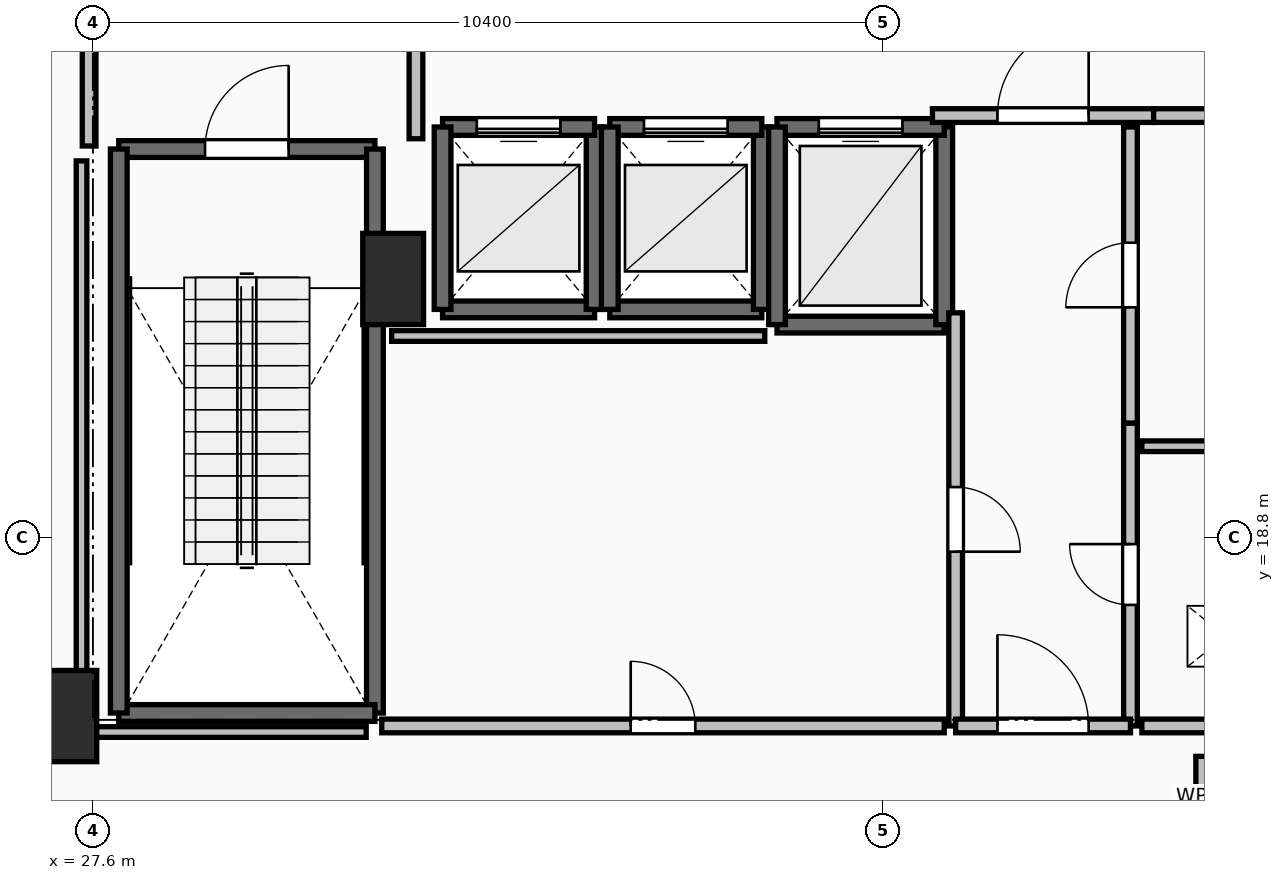
"""IFC4 building model, lengths in metres.
Left out: names, types, materials, properties, quantities, classifications, styles, units other than length and angle.
Written with IfcOpenShell. Run it as: python <this file> out.ifc"""

import sys

from ifc_helpers import new_model, si_unit, direction, frame, frame_2d, origin, origin_2d, place, context, subcontext, project, spatial, rectangle, extrude, element, fill, save


model = new_model("IFC4")
c1 = context("Model", 3, precision=1e-05, world=origin(), true_north=direction((0.0, 1.0)))
c2 = subcontext(c1, "Body", "Model", "MODEL_VIEW")
j1 = project(units=[si_unit("LENGTHUNIT", "METRE"), si_unit("PLANEANGLEUNIT", "RADIAN")], contexts=[c1])
p1 = place(None, origin())
s1 = spatial("IfcSite", under=j1, at=p1, CompositionType="ELEMENT")
p2 = place(p1, origin())
s2 = spatial("IfcBuilding", under=s1, at=p2, CompositionType="ELEMENT")
p3 = place(p2, origin())
s3 = spatial("IfcBuildingStorey", under=s2, at=p3, CompositionType="ELEMENT", Elevation=0.0)
for number, where, z_axis, x_axis in (
    (1, (27.25, 16.45, 0.0), (0.0, 0.0, 1.0), (1.0, 0.0, 0.0)),
    (2, (31.55, 22.2, 0.0), (0.0, 0.0, 1.0), (1.0, 0.0, 0.0)),
):
    element("IfcColumn", number, at=place(p3, frame(where, z_axis=z_axis, x_axis=x_axis)), inside=s3, PredefinedType="PILASTER", context=c2, shape_type="SweptSolid", body=[
        extrude(rectangle(XDim=0.8, YDim=1.2, at=origin_2d()), origin(), (0.0, 0.0, 1.0), 4.8),
    ])
p4 = place(p3, frame((27.94, 23.91, 0.0), z_axis=(0.0, 0.0, 1.0), x_axis=(1.0, 0.0, 0.0)))
e3 = element("IfcWall", 3, at=p4, inside=s3, PredefinedType="SOLIDWALL", context=c2, shape_type="SweptSolid", body=[
    extrude(rectangle(XDim=3.37, YDim=0.22, at=frame_2d((1.685, 0.0))), origin(), (0.0, 0.0, 1.0), 4.48),
])
p5 = place(p4, frame((1.135, 0.0, 0.0)))
e4 = element("IfcOpeningElement", 4, at=p5, cuts=e3, PredefinedType="OPENING", context=c2, shape_type="SweptSolid", body=[
    extrude(rectangle(XDim=1.1, YDim=2.15, at=frame_2d((0.55, 1.075))), frame((0.0, 0.125, 0.0), z_axis=(0.0, -1.0, 0.0), x_axis=(1.0, 0.0, 0.0)), (0.0, 0.0, 1.0), 0.25),
])
p6 = place(p3, frame((31.31, 23.91, 0.0), z_axis=(0.0, 0.0, 1.0), x_axis=(0.0, -1.0, 0.0)))
e5 = element("IfcWall", 5, at=p6, inside=s3, PredefinedType="SOLIDWALL", context=c2, shape_type="SweptSolid", body=[
    extrude(rectangle(XDim=7.42, YDim=0.22, at=frame_2d((3.71, 0.0))), origin(), (0.0, 0.0, 1.0), 4.48),
])
p7 = place(p3, frame((31.31, 16.49, 0.0), z_axis=(0.0, 0.0, 1.0), x_axis=(-1.0, 0.0, 0.0)))
e6 = element("IfcWall", 6, at=p7, inside=s3, PredefinedType="SOLIDWALL", context=c2, shape_type="SweptSolid", body=[
    extrude(rectangle(XDim=3.37, YDim=0.22, at=frame_2d((1.685, 0.0))), origin(), (0.0, 0.0, 1.0), 4.48),
])
p8 = place(p3, frame((27.94, 16.49, 0.0), z_axis=(0.0, 0.0, 1.0), x_axis=(0.0, 1.0, 0.0)))
e7 = element("IfcWall", 7, at=p8, inside=s3, PredefinedType="SOLIDWALL", context=c2, shape_type="SweptSolid", body=[
    extrude(rectangle(XDim=7.42, YDim=0.22, at=frame_2d((3.71, 0.0))), origin(), (0.0, 0.0, 1.0), 4.48),
])
p9 = place(p3, frame((32.2, 21.8, 0.0), z_axis=(0.0, 0.0, 1.0), x_axis=(1.0, 0.0, 0.0)))
e8 = element("IfcWall", 8, at=p9, inside=s3, PredefinedType="SOLIDWALL", context=c2, shape_type="SweptSolid", body=[
    extrude(rectangle(XDim=2.0, YDim=0.22, at=frame_2d((1.0, 0.0))), origin(), (0.0, 0.0, 1.0), 4.48),
])
p10 = place(p3, frame((34.2, 21.8, 0.0), z_axis=(0.0, 0.0, 1.0), x_axis=(0.0, 1.0, 0.0)))
e9 = element("IfcWall", 9, at=p10, inside=s3, PredefinedType="SOLIDWALL", context=c2, shape_type="SweptSolid", body=[
    extrude(rectangle(XDim=2.4, YDim=0.22, at=frame_2d((1.2, 0.0))), origin(), (0.0, 0.0, 1.0), 4.48),
])
p11 = place(p3, frame((34.2, 24.2, 0.0), z_axis=(0.0, 0.0, 1.0), x_axis=(-1.0, 0.0, 0.0)))
e10 = element("IfcWall", 10, at=p11, inside=s3, PredefinedType="SOLIDWALL", context=c2, shape_type="SweptSolid", body=[
    extrude(rectangle(XDim=2.0, YDim=0.22, at=frame_2d((1.0, 0.0))), origin(), (0.0, 0.0, 1.0), 4.48),
])
p12 = place(p11, frame((0.45, 0.0, 0.0)))
e11 = element("IfcOpeningElement", 11, at=p12, cuts=e10, PredefinedType="OPENING", context=c2, shape_type="SweptSolid", body=[
    extrude(rectangle(XDim=1.1, YDim=2.2, at=frame_2d((0.55, 1.1))), frame((0.0, 0.125, 0.0), z_axis=(0.0, -1.0, 0.0), x_axis=(1.0, 0.0, 0.0)), (0.0, 0.0, 1.0), 0.25),
])
p13 = place(p3, frame((32.2, 24.2, 0.0), z_axis=(0.0, 0.0, 1.0), x_axis=(0.0, -1.0, 0.0)))
e12 = element("IfcWall", 12, at=p13, inside=s3, PredefinedType="SOLIDWALL", context=c2, shape_type="SweptSolid", body=[
    extrude(rectangle(XDim=2.4, YDim=0.22, at=frame_2d((1.2, 0.0))), origin(), (0.0, 0.0, 1.0), 4.48),
])
p14 = place(p3, frame((34.4, 21.8, 0.0), z_axis=(0.0, 0.0, 1.0), x_axis=(1.0, 0.0, 0.0)))
e13 = element("IfcWall", 13, at=p14, inside=s3, PredefinedType="SOLIDWALL", context=c2, shape_type="SweptSolid", body=[
    extrude(rectangle(XDim=2.0, YDim=0.22, at=frame_2d((1.0, 0.0))), origin(), (0.0, 0.0, 1.0), 4.48),
])
p15 = place(p3, frame((36.4, 21.8, 0.0), z_axis=(0.0, 0.0, 1.0), x_axis=(0.0, 1.0, 0.0)))
e14 = element("IfcWall", 14, at=p15, inside=s3, PredefinedType="SOLIDWALL", context=c2, shape_type="SweptSolid", body=[
    extrude(rectangle(XDim=2.4, YDim=0.22, at=frame_2d((1.2, 0.0))), origin(), (0.0, 0.0, 1.0), 4.48),
])
p16 = place(p3, frame((36.4, 24.2, 0.0), z_axis=(0.0, 0.0, 1.0), x_axis=(-1.0, 0.0, 0.0)))
e15 = element("IfcWall", 15, at=p16, inside=s3, PredefinedType="SOLIDWALL", context=c2, shape_type="SweptSolid", body=[
    extrude(rectangle(XDim=2.0, YDim=0.22, at=frame_2d((1.0, 0.0))), origin(), (0.0, 0.0, 1.0), 4.48),
])
p17 = place(p16, frame((0.45, 0.0, 0.0)))
e16 = element("IfcOpeningElement", 16, at=p17, cuts=e15, PredefinedType="OPENING", context=c2, shape_type="SweptSolid", body=[
    extrude(rectangle(XDim=1.1, YDim=2.2, at=frame_2d((0.55, 1.1))), frame((0.0, 0.125, 0.0), z_axis=(0.0, -1.0, 0.0), x_axis=(1.0, 0.0, 0.0)), (0.0, 0.0, 1.0), 0.25),
])
p18 = place(p3, frame((34.4, 24.2, 0.0), z_axis=(0.0, 0.0, 1.0), x_axis=(0.0, -1.0, 0.0)))
e17 = element("IfcWall", 17, at=p18, inside=s3, PredefinedType="SOLIDWALL", context=c2, shape_type="SweptSolid", body=[
    extrude(rectangle(XDim=2.4, YDim=0.22, at=frame_2d((1.2, 0.0))), origin(), (0.0, 0.0, 1.0), 4.48),
])
p19 = place(p3, frame((36.6, 21.6, 0.0), z_axis=(0.0, 0.0, 1.0), x_axis=(1.0, 0.0, 0.0)))
e18 = element("IfcWall", 18, at=p19, inside=s3, PredefinedType="SOLIDWALL", context=c2, shape_type="SweptSolid", body=[
    extrude(rectangle(XDim=2.2, YDim=0.22, at=frame_2d((1.1, 0.0))), origin(), (0.0, 0.0, 1.0), 4.48),
])
p20 = place(p3, frame((38.8, 21.6, 0.0), z_axis=(0.0, 0.0, 1.0), x_axis=(0.0, 1.0, 0.0)))
e19 = element("IfcWall", 19, at=p20, inside=s3, PredefinedType="SOLIDWALL", context=c2, shape_type="SweptSolid", body=[
    extrude(rectangle(XDim=2.6, YDim=0.22, at=frame_2d((1.3, 0.0))), origin(), (0.0, 0.0, 1.0), 4.48),
])
p21 = place(p3, frame((38.8, 24.2, 0.0), z_axis=(0.0, 0.0, 1.0), x_axis=(-1.0, 0.0, 0.0)))
e20 = element("IfcWall", 20, at=p21, inside=s3, PredefinedType="SOLIDWALL", context=c2, shape_type="SweptSolid", body=[
    extrude(rectangle(XDim=2.2, YDim=0.22, at=frame_2d((1.1, 0.0))), origin(), (0.0, 0.0, 1.0), 4.48),
])
p22 = place(p21, frame((0.55, 0.0, 0.0)))
e21 = element("IfcOpeningElement", 21, at=p22, cuts=e20, PredefinedType="OPENING", context=c2, shape_type="SweptSolid", body=[
    extrude(rectangle(XDim=1.1, YDim=2.2, at=frame_2d((0.55, 1.1))), frame((0.0, 0.125, 0.0), z_axis=(0.0, -1.0, 0.0), x_axis=(1.0, 0.0, 0.0)), (0.0, 0.0, 1.0), 0.25),
])
p23 = place(p3, frame((36.6, 24.2, 0.0), z_axis=(0.0, 0.0, 1.0), x_axis=(0.0, -1.0, 0.0)))
e22 = element("IfcWall", 22, at=p23, inside=s3, PredefinedType="SOLIDWALL", context=c2, shape_type="SweptSolid", body=[
    extrude(rectangle(XDim=2.6, YDim=0.22, at=frame_2d((1.3, 0.0))), origin(), (0.0, 0.0, 1.0), 4.48),
])
p24 = place(p3, frame((31.85, 24.045, 0.0), z_axis=(0.0, 0.0, 1.0), x_axis=(0.0, 1.0, 0.0)))
e23 = element("IfcWall", 23, at=p24, inside=s3, PredefinedType="PARTITIONING", context=c2, shape_type="SweptSolid", body=[
    extrude(rectangle(XDim=3.91, YDim=0.18, at=frame_2d((1.955, 0.0))), origin(), (0.0, 0.0, 1.0), 4.48),
])
p25 = place(p24, frame((1.355, 0.0, 0.0)))
e24 = element("IfcOpeningElement", 24, at=p25, cuts=e23, PredefinedType="OPENING", context=c2, shape_type="SweptSolid", body=[
    extrude(rectangle(XDim=1.2, YDim=2.15, at=frame_2d((0.6, 1.075))), frame((0.0, 0.105, 0.0), z_axis=(0.0, -1.0, 0.0), x_axis=(1.0, 0.0, 0.0)), (0.0, 0.0, 1.0), 0.21),
])
p26 = place(p3, frame((27.55, 28.0, 0.0), z_axis=(0.0, 0.0, 1.0), x_axis=(0.0, -1.0, 0.0)))
e25 = element("IfcWall", 25, at=p26, inside=s3, PredefinedType="PARTITIONING", context=c2, shape_type="SweptSolid", body=[
    extrude(rectangle(XDim=4.05, YDim=0.18, at=frame_2d((2.025, 0.0))), origin(), (0.0, 0.0, 1.0), 4.48),
])
p27 = place(p26, frame((1.425, 0.0, 0.0)))
e26 = element("IfcOpeningElement", 26, at=p27, cuts=e25, PredefinedType="OPENING", context=c2, shape_type="SweptSolid", body=[
    extrude(rectangle(XDim=1.2, YDim=2.15, at=frame_2d((0.6, 1.075))), frame((0.0, 0.105, 0.0), z_axis=(0.0, -1.0, 0.0), x_axis=(1.0, 0.0, 0.0)), (0.0, 0.0, 1.0), 0.21),
])
p28 = place(p3, frame((38.645, 24.35, 0.0), z_axis=(0.0, 0.0, 1.0), x_axis=(1.0, 0.0, 0.0)))
e27 = element("IfcWall", 27, at=p28, inside=s3, PredefinedType="PARTITIONING", context=c2, shape_type="SweptSolid", body=[
    extrude(rectangle(XDim=2.91, YDim=0.18, at=frame_2d((1.455, 0.0))), origin(), (0.0, 0.0, 1.0), 4.48),
])
p29 = place(p28, frame((0.855, 0.0, 0.0)))
e28 = element("IfcOpeningElement", 28, at=p29, cuts=e27, PredefinedType="OPENING", context=c2, shape_type="SweptSolid", body=[
    extrude(rectangle(XDim=1.2, YDim=2.15, at=frame_2d((0.6, 1.075))), frame((0.0, 0.105, 0.0), z_axis=(0.0, -1.0, 0.0), x_axis=(1.0, 0.0, 0.0)), (0.0, 0.0, 1.0), 0.21),
])
p30 = place(p3, frame((41.555, 24.35, 0.0), z_axis=(0.0, 0.0, 1.0), x_axis=(1.0, 0.0, 0.0)))
e29 = element("IfcWall", 29, at=p30, inside=s3, PredefinedType="PARTITIONING", context=c2, shape_type="SweptSolid", body=[
    extrude(rectangle(XDim=2.445, YDim=0.18, at=frame_2d((1.223, 0.0))), origin(), (0.0, 0.0, 1.0), 4.48),
])
p31 = place(p30, frame((0.798, 0.0, 0.0)))
e30 = element("IfcOpeningElement", 30, at=p31, cuts=e29, PredefinedType="OPENING", context=c2, shape_type="SweptSolid", body=[
    extrude(rectangle(XDim=0.85, YDim=2.1, at=frame_2d((0.425, 1.05))), frame((0.0, 0.105, 0.0), z_axis=(0.0, -1.0, 0.0), x_axis=(1.0, 0.0, 0.0)), (0.0, 0.0, 1.0), 0.21),
])
p32 = place(p3, frame((41.25, 16.32, 0.0), z_axis=(0.0, 0.0, 1.0), x_axis=(0.0, 1.0, 0.0)))
e31 = element("IfcWall", 31, at=p32, inside=s3, PredefinedType="PARTITIONING", context=c2, shape_type="SweptSolid", body=[
    extrude(rectangle(XDim=3.985, YDim=0.18, at=frame_2d((1.992, 0.0))), origin(), (0.0, 0.0, 1.0), 4.48),
])
p33 = place(p32, frame((1.593, 0.0, 0.0)))
e32 = element("IfcOpeningElement", 32, at=p33, cuts=e31, PredefinedType="OPENING", context=c2, shape_type="SweptSolid", body=[
    extrude(rectangle(XDim=0.8, YDim=2.05, at=frame_2d((0.4, 1.025))), frame((0.0, 0.105, 0.0), z_axis=(0.0, -1.0, 0.0), x_axis=(1.0, 0.0, 0.0)), (0.0, 0.0, 1.0), 0.21),
])
p34 = place(p3, frame((41.25, 20.305, 0.0), z_axis=(0.0, 0.0, 1.0), x_axis=(0.0, 1.0, 0.0)))
e33 = element("IfcWall", 33, at=p34, inside=s3, PredefinedType="PARTITIONING", context=c2, shape_type="SweptSolid", body=[
    extrude(rectangle(XDim=3.895, YDim=0.18, at=frame_2d((1.948, 0.0))), origin(), (0.0, 0.0, 1.0), 4.48),
])
p35 = place(p34, frame((1.522, 0.0, 0.0)))
e34 = element("IfcOpeningElement", 34, at=p35, cuts=e33, PredefinedType="OPENING", context=c2, shape_type="SweptSolid", body=[
    extrude(rectangle(XDim=0.85, YDim=2.1, at=frame_2d((0.425, 1.05))), frame((0.0, 0.105, 0.0), z_axis=(0.0, -1.0, 0.0), x_axis=(1.0, 0.0, 0.0)), (0.0, 0.0, 1.0), 0.21),
])
p36 = place(p3, frame((38.95, 21.755, 0.0), z_axis=(0.0, 0.0, 1.0), x_axis=(0.0, -1.0, 0.0)))
e35 = element("IfcWall", 35, at=p36, inside=s3, PredefinedType="PARTITIONING", context=c2, shape_type="SweptSolid", body=[
    extrude(rectangle(XDim=5.435, YDim=0.18, at=frame_2d((2.717, 0.0))), origin(), (0.0, 0.0, 1.0), 4.48),
])
p37 = place(p36, frame((2.292, 0.0, 0.0)))
e36 = element("IfcOpeningElement", 36, at=p37, cuts=e35, PredefinedType="OPENING", context=c2, shape_type="SweptSolid", body=[
    extrude(rectangle(XDim=0.85, YDim=2.1, at=frame_2d((0.425, 1.05))), frame((0.0, 0.105, 0.0), z_axis=(0.0, -1.0, 0.0), x_axis=(1.0, 0.0, 0.0)), (0.0, 0.0, 1.0), 0.21),
])
p38 = place(p3, frame((38.95, 16.32, 0.0), z_axis=(0.0, 0.0, 1.0), x_axis=(1.0, 0.0, 0.0)))
e37 = element("IfcWall", 37, at=p38, inside=s3, PredefinedType="PARTITIONING", context=c2, shape_type="SweptSolid", body=[
    extrude(rectangle(XDim=2.3, YDim=0.18, at=frame_2d((1.15, 0.0))), origin(), (0.0, 0.0, 1.0), 4.48),
])
p39 = place(p38, frame((0.55, 0.0, 0.0)))
e38 = element("IfcOpeningElement", 38, at=p39, cuts=e37, PredefinedType="OPENING", context=c2, shape_type="SweptSolid", body=[
    extrude(rectangle(XDim=1.2, YDim=2.15, at=frame_2d((0.6, 1.075))), frame((0.0, 0.105, 0.0), z_axis=(0.0, -1.0, 0.0), x_axis=(1.0, 0.0, 0.0)), (0.0, 0.0, 1.0), 0.21),
])
p40 = place(p3, frame((44.6, 20.0, 0.0), z_axis=(0.0, 0.0, 1.0), x_axis=(-1.0, 0.0, 0.0)))
e39 = element("IfcWall", 39, at=p40, inside=s3, PredefinedType="PARTITIONING", context=c2, shape_type="SweptSolid", body=[
    extrude(rectangle(XDim=3.2, YDim=0.14, at=frame_2d((1.6, 0.0))), origin(), (0.0, 0.0, 1.0), 4.48),
])
p41 = place(p3, frame((41.4, 16.32, 0.0), z_axis=(0.0, 0.0, 1.0), x_axis=(1.0, 0.0, 0.0)))
e40 = element("IfcWall", 40, at=p41, inside=s3, PredefinedType="PARTITIONING", context=c2, shape_type="SweptSolid", body=[
    extrude(rectangle(XDim=3.2, YDim=0.18, at=frame_2d((1.6, 0.0))), origin(), (0.0, 0.0, 1.0), 4.48),
])
p42 = place(p41, frame((1.2, 0.0, 0.0)))
e41 = element("IfcOpeningElement", 41, at=p42, cuts=e40, PredefinedType="OPENING", context=c2, shape_type="SweptSolid", body=[
    extrude(rectangle(XDim=0.8, YDim=2.05, at=frame_2d((0.4, 1.025))), frame((0.0, 0.105, 0.0), z_axis=(0.0, -1.0, 0.0), x_axis=(1.0, 0.0, 0.0)), (0.0, 0.0, 1.0), 0.21),
])
p43 = place(p3, frame((31.4, 16.32, 0.0), z_axis=(0.0, 0.0, 1.0), x_axis=(1.0, 0.0, 0.0)))
e42 = element("IfcWall", 42, at=p43, inside=s3, PredefinedType="PARTITIONING", context=c2, shape_type="SweptSolid", body=[
    extrude(rectangle(XDim=7.4, YDim=0.18, at=frame_2d((3.7, 0.0))), origin(), (0.0, 0.0, 1.0), 4.48),
])
p44 = place(p43, frame((3.275, 0.0, 0.0)))
e43 = element("IfcOpeningElement", 43, at=p44, cuts=e42, PredefinedType="OPENING", context=c2, shape_type="SweptSolid", body=[
    extrude(rectangle(XDim=0.85, YDim=2.1, at=frame_2d((0.425, 1.05))), frame((0.0, 0.105, 0.0), z_axis=(0.0, -1.0, 0.0), x_axis=(1.0, 0.0, 0.0)), (0.0, 0.0, 1.0), 0.21),
])
p45 = place(p3, frame((42.2, 14.1, 0.0), z_axis=(0.0, 0.0, 1.0), x_axis=(0.0, 1.0, 0.0)))
e44 = element("IfcWall", 44, at=p45, inside=s3, PredefinedType="PARTITIONING", context=c2, shape_type="SweptSolid", body=[
    extrude(rectangle(XDim=1.82, YDim=0.18, at=frame_2d((0.91, 0.0))), origin(), (0.0, 0.0, 1.0), 4.48),
])
p46 = place(p3, frame((36.439, 21.45, 0.0), z_axis=(0.0, 0.0, 1.0), x_axis=(-1.0, 0.0, 0.0)))
e45 = element("IfcWall", 45, at=p46, inside=s3, PredefinedType="PARTITIONING", context=c2, shape_type="SweptSolid", body=[
    extrude(rectangle(XDim=4.909, YDim=0.14, at=frame_2d((2.455, 0.0))), origin(), (0.0, 0.0, 1.0), 4.48),
])
p47 = place(p3, frame((31.195, 16.24, 0.0), z_axis=(0.0, 0.0, 1.0), x_axis=(-1.0, 0.0, 0.0)))
e46 = element("IfcWall", 46, at=p47, inside=s3, PredefinedType="PARTITIONING", context=c2, shape_type="SweptSolid", body=[
    extrude(rectangle(XDim=3.745, YDim=0.14, at=frame_2d((1.873, 0.0))), origin(), (0.0, 0.0, 1.0), 3.672),
])
p48 = place(p3, frame((27.45, 16.24, 0.0), z_axis=(0.0, 0.0, 1.0), x_axis=(0.0, 1.0, 0.0)))
e47 = element("IfcWall", 47, at=p48, inside=s3, PredefinedType="PARTITIONING", context=c2, shape_type="SweptSolid", body=[
    extrude(rectangle(XDim=7.514, YDim=0.14, at=frame_2d((3.757, 0.0))), origin(), (0.0, 0.0, 1.0), 2.406),
])
p49 = place(p5, origin())
e48 = element("IfcDoor", 48, at=p49, inside=s3, OperationType="SINGLE_SWING_RIGHT", PredefinedType="DOOR", context=c2, shape_type="SweptSolid", body=[
    extrude(rectangle(XDim=1.1, YDim=2.15, at=frame_2d((0.55, 1.075))), frame((0.0, 0.025, 0.0), z_axis=(0.0, -1.0, 0.0), x_axis=(1.0, 0.0, 0.0)), (0.0, 0.0, 1.0), 0.05),
])
fill(e4, e48)
p50 = place(p12, origin())
e49 = element("IfcDoor", 49, at=p50, inside=s3, OperationType="SLIDING_TO_LEFT", PredefinedType="DOOR", context=c2, shape_type="SweptSolid", body=[
    extrude(rectangle(XDim=1.1, YDim=2.2, at=frame_2d((0.55, 1.1))), frame((0.0, 0.025, 0.0), z_axis=(0.0, -1.0, 0.0), x_axis=(1.0, 0.0, 0.0)), (0.0, 0.0, 1.0), 0.05),
])
fill(e11, e49)
p51 = place(p17, origin())
e50 = element("IfcDoor", 50, at=p51, inside=s3, OperationType="SLIDING_TO_LEFT", PredefinedType="DOOR", context=c2, shape_type="SweptSolid", body=[
    extrude(rectangle(XDim=1.1, YDim=2.2, at=frame_2d((0.55, 1.1))), frame((0.0, 0.025, 0.0), z_axis=(0.0, -1.0, 0.0), x_axis=(1.0, 0.0, 0.0)), (0.0, 0.0, 1.0), 0.05),
])
fill(e16, e50)
p52 = place(p22, origin())
e51 = element("IfcDoor", 51, at=p52, inside=s3, OperationType="SLIDING_TO_LEFT", PredefinedType="DOOR", context=c2, shape_type="SweptSolid", body=[
    extrude(rectangle(XDim=1.1, YDim=2.2, at=frame_2d((0.55, 1.1))), frame((0.0, 0.025, 0.0), z_axis=(0.0, -1.0, 0.0), x_axis=(1.0, 0.0, 0.0)), (0.0, 0.0, 1.0), 0.05),
])
fill(e21, e51)
p53 = place(p29, origin())
e52 = element("IfcDoor", 52, at=p53, inside=s3, OperationType="SINGLE_SWING_RIGHT", PredefinedType="DOOR", context=c2, shape_type="SweptSolid", body=[
    extrude(rectangle(XDim=1.2, YDim=2.15, at=frame_2d((0.6, 1.075))), frame((0.0, 0.025, 0.0), z_axis=(0.0, -1.0, 0.0), x_axis=(1.0, 0.0, 0.0)), (0.0, 0.0, 1.0), 0.05),
])
fill(e28, e52)
p54 = place(p33, origin())
e53 = element("IfcDoor", 53, at=p54, inside=s3, OperationType="SINGLE_SWING_RIGHT", PredefinedType="DOOR", context=c2, shape_type="SweptSolid", body=[
    extrude(rectangle(XDim=0.8, YDim=2.05, at=frame_2d((0.4, 1.025))), frame((0.0, 0.025, 0.0), z_axis=(0.0, -1.0, 0.0), x_axis=(1.0, 0.0, 0.0)), (0.0, 0.0, 1.0), 0.05),
])
fill(e32, e53)
p55 = place(p35, origin())
e54 = element("IfcDoor", 54, at=p55, inside=s3, OperationType="SINGLE_SWING_LEFT", PredefinedType="DOOR", context=c2, shape_type="SweptSolid", body=[
    extrude(rectangle(XDim=0.85, YDim=2.1, at=frame_2d((0.425, 1.05))), frame((0.0, 0.025, 0.0), z_axis=(0.0, -1.0, 0.0), x_axis=(1.0, 0.0, 0.0)), (0.0, 0.0, 1.0), 0.05),
])
fill(e34, e54)
p56 = place(p37, origin())
e55 = element("IfcDoor", 55, at=p56, inside=s3, OperationType="SINGLE_SWING_RIGHT", PredefinedType="DOOR", context=c2, shape_type="SweptSolid", body=[
    extrude(rectangle(XDim=0.85, YDim=2.1, at=frame_2d((0.425, 1.05))), frame((0.0, 0.025, 0.0), z_axis=(0.0, -1.0, 0.0), x_axis=(1.0, 0.0, 0.0)), (0.0, 0.0, 1.0), 0.05),
])
fill(e36, e55)
p57 = place(p39, origin())
e56 = element("IfcDoor", 56, at=p57, inside=s3, OperationType="SINGLE_SWING_LEFT", PredefinedType="DOOR", context=c2, shape_type="SweptSolid", body=[
    extrude(rectangle(XDim=1.2, YDim=2.15, at=frame_2d((0.6, 1.075))), frame((0.0, 0.025, 0.0), z_axis=(0.0, -1.0, 0.0), x_axis=(1.0, 0.0, 0.0)), (0.0, 0.0, 1.0), 0.05),
])
fill(e38, e56)
p58 = place(p44, origin())
e57 = element("IfcDoor", 57, at=p58, inside=s3, OperationType="SINGLE_SWING_LEFT", PredefinedType="DOOR", context=c2, shape_type="SweptSolid", body=[
    extrude(rectangle(XDim=0.85, YDim=2.1, at=frame_2d((0.425, 1.05))), frame((0.0, 0.025, 0.0), z_axis=(0.0, -1.0, 0.0), x_axis=(1.0, 0.0, 0.0)), (0.0, 0.0, 1.0), 0.05),
])
fill(e43, e57)
save(model, sys.argv[1])
